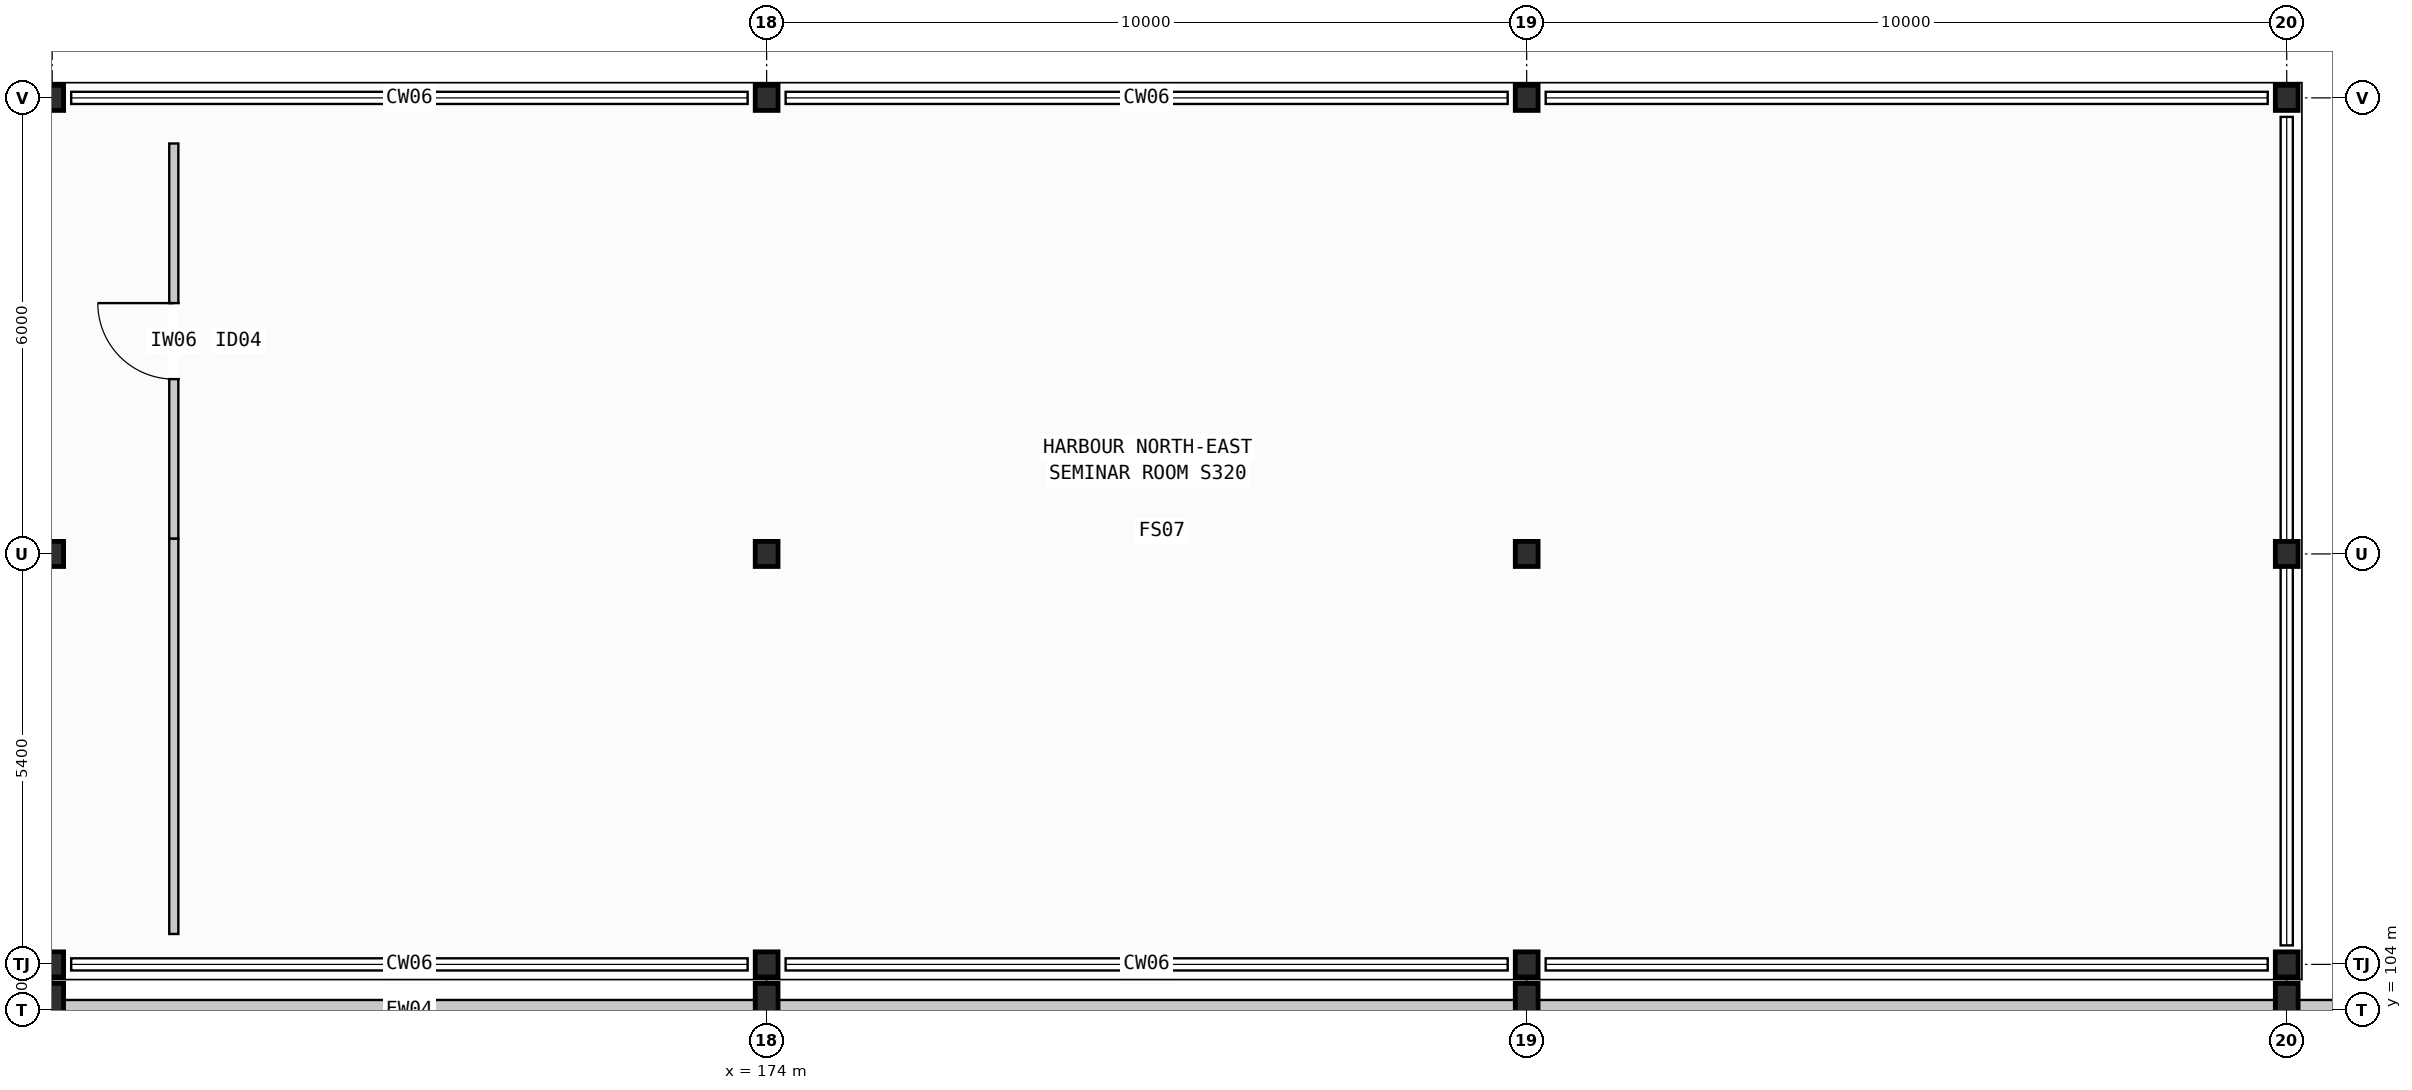
"""IFC4 building model, lengths in metres.
Left out: names, types, materials, properties, quantities, classifications, styles, units other than length and angle.
Written with IfcOpenShell. Run it as: python <this file> out.ifc"""

import sys

from ifc_helpers import new_model, si_unit, direction, frame, frame_2d, origin, origin_2d, place, context, subcontext, project, spatial, rectangle, i_section, extrude, element, fill, save


model = new_model("IFC4")
c1 = context("Model", 3, precision=1e-05, world=origin(), true_north=direction((0.0, 1.0)))
c2 = subcontext(c1, "Body", "Model", "MODEL_VIEW")
j1 = project(units=[si_unit("LENGTHUNIT", "METRE"), si_unit("PLANEANGLEUNIT", "RADIAN")], contexts=[c1])
p1 = place(None, origin())
s1 = spatial("IfcSite", under=j1, at=p1, CompositionType="ELEMENT")
p2 = place(p1, origin())
s2 = spatial("IfcBuilding", under=s1, at=p2, CompositionType="ELEMENT")
p3 = place(p2, frame((0.0, 0.0, 16.8)))
s3 = spatial("IfcBuildingStorey", under=s2, at=p3, CompositionType="ELEMENT", Elevation=16.8)
p4 = place(p3, frame((164.6, 104.0, 0.0), z_axis=(0.0, 0.0, 1.0), x_axis=(1.0, 0.0, 0.0)))
e1 = element("IfcColumn", 1, at=p4, inside=s3, PredefinedType="COLUMN", context=c2, shape_type="SweptSolid", body=[
    extrude(i_section(OverallWidth=0.3, OverallDepth=0.7, WebThickness=0.017, FlangeThickness=0.032, FilletRadius=0.027, at=origin_2d()), origin(), (0.0, 0.0, 1.0), 5.0),
])
for number, where, z_axis, x_axis in (
    (2, (164.6, 104.6, 0.0), (0.0, 0.0, 1.0), (1.0, 0.0, 0.0)),
    (3, (164.6, 110.0, 0.0), (0.0, 0.0, 1.0), (1.0, 0.0, 0.0)),
    (4, (164.6, 116.0, 0.0), (0.0, 0.0, 1.0), (1.0, 0.0, 0.0)),
):
    element("IfcColumn", number, at=place(p3, frame(where, z_axis=z_axis, x_axis=x_axis)), inside=s3, PredefinedType="COLUMN", context=c2, shape_type="SweptSolid", body=[
        extrude(i_section(OverallWidth=0.3, OverallDepth=0.33, WebThickness=0.01, FlangeThickness=0.017, FilletRadius=0.027, at=origin_2d()), origin(), (0.0, 0.0, 1.0), 4.8),
    ])
p5 = place(p3, frame((174.0, 104.0, 0.0), z_axis=(0.0, 0.0, 1.0), x_axis=(1.0, 0.0, 0.0)))
e5 = element("IfcColumn", 5, at=p5, inside=s3, PredefinedType="COLUMN", context=c2, shape_type="SweptSolid", body=[
    extrude(i_section(OverallWidth=0.3, OverallDepth=0.7, WebThickness=0.017, FlangeThickness=0.032, FilletRadius=0.027, at=origin_2d()), origin(), (0.0, 0.0, 1.0), 5.0),
])
for number, where, z_axis, x_axis in (
    (6, (174.0, 104.6, 0.0), (0.0, 0.0, 1.0), (1.0, 0.0, 0.0)),
    (7, (174.0, 110.0, 0.0), (0.0, 0.0, 1.0), (1.0, 0.0, 0.0)),
    (8, (174.0, 116.0, 0.0), (0.0, 0.0, 1.0), (1.0, 0.0, 0.0)),
):
    element("IfcColumn", number, at=place(p3, frame(where, z_axis=z_axis, x_axis=x_axis)), inside=s3, PredefinedType="COLUMN", context=c2, shape_type="SweptSolid", body=[
        extrude(i_section(OverallWidth=0.3, OverallDepth=0.33, WebThickness=0.01, FlangeThickness=0.017, FilletRadius=0.027, at=origin_2d()), origin(), (0.0, 0.0, 1.0), 4.8),
    ])
p6 = place(p3, frame((184.0, 104.0, 0.0), z_axis=(0.0, 0.0, 1.0), x_axis=(1.0, 0.0, 0.0)))
e9 = element("IfcColumn", 9, at=p6, inside=s3, PredefinedType="COLUMN", context=c2, shape_type="SweptSolid", body=[
    extrude(i_section(OverallWidth=0.3, OverallDepth=0.7, WebThickness=0.017, FlangeThickness=0.032, FilletRadius=0.027, at=origin_2d()), origin(), (0.0, 0.0, 1.0), 5.0),
])
for number, where, z_axis, x_axis in (
    (10, (184.0, 104.6, 0.0), (0.0, 0.0, 1.0), (1.0, 0.0, 0.0)),
    (11, (184.0, 110.0, 0.0), (0.0, 0.0, 1.0), (1.0, 0.0, 0.0)),
    (12, (184.0, 116.0, 0.0), (0.0, 0.0, 1.0), (1.0, 0.0, 0.0)),
):
    element("IfcColumn", number, at=place(p3, frame(where, z_axis=z_axis, x_axis=x_axis)), inside=s3, PredefinedType="COLUMN", context=c2, shape_type="SweptSolid", body=[
        extrude(i_section(OverallWidth=0.3, OverallDepth=0.33, WebThickness=0.01, FlangeThickness=0.017, FilletRadius=0.027, at=origin_2d()), origin(), (0.0, 0.0, 1.0), 4.8),
    ])
p7 = place(p3, frame((194.0, 104.0, 0.0), z_axis=(0.0, 0.0, 1.0), x_axis=(1.0, 0.0, 0.0)))
e13 = element("IfcColumn", 13, at=p7, inside=s3, PredefinedType="COLUMN", context=c2, shape_type="SweptSolid", body=[
    extrude(i_section(OverallWidth=0.3, OverallDepth=0.7, WebThickness=0.017, FlangeThickness=0.032, FilletRadius=0.027, at=origin_2d()), origin(), (0.0, 0.0, 1.0), 5.0),
])
for number, where, z_axis, x_axis in (
    (14, (194.0, 104.6, 0.0), (0.0, 0.0, 1.0), (1.0, 0.0, 0.0)),
    (15, (194.0, 110.0, 0.0), (0.0, 0.0, 1.0), (1.0, 0.0, 0.0)),
    (16, (194.0, 116.0, 0.0), (0.0, 0.0, 1.0), (1.0, 0.0, 0.0)),
):
    element("IfcColumn", number, at=place(p3, frame(where, z_axis=z_axis, x_axis=x_axis)), inside=s3, PredefinedType="COLUMN", context=c2, shape_type="SweptSolid", body=[
        extrude(i_section(OverallWidth=0.3, OverallDepth=0.33, WebThickness=0.01, FlangeThickness=0.017, FilletRadius=0.027, at=origin_2d()), origin(), (0.0, 0.0, 1.0), 4.8),
    ])
p8 = place(p3, frame((164.74, 104.0, -0.805), z_axis=(0.0, 0.0, 1.0), x_axis=(1.0, 0.0, 0.0)))
e17 = element("IfcWall", 17, at=p8, inside=s3, PredefinedType="STANDARD", context=c2, shape_type="SweptSolid", body=[
    extrude(rectangle(XDim=9.12, YDim=0.264, at=frame_2d((4.56, 0.0))), origin(), (0.0, 0.0, 1.0), 4.462),
])
p9 = place(p3, frame((174.14, 104.0, -0.805), z_axis=(0.0, 0.0, 1.0), x_axis=(1.0, 0.0, 0.0)))
e18 = element("IfcWall", 18, at=p9, inside=s3, PredefinedType="STANDARD", context=c2, shape_type="SweptSolid", body=[
    extrude(rectangle(XDim=9.72, YDim=0.264, at=frame_2d((4.86, 0.0))), origin(), (0.0, 0.0, 1.0), 6.333),
])
p10 = place(p3, frame((184.14, 104.0, -0.805), z_axis=(0.0, 0.0, 1.0), x_axis=(1.0, 0.0, 0.0)))
e19 = element("IfcWall", 19, at=p10, inside=s3, PredefinedType="STANDARD", context=c2, shape_type="SweptSolid", body=[
    extrude(rectangle(XDim=9.72, YDim=0.264, at=frame_2d((4.86, 0.0))), origin(), (0.0, 0.0, 1.0), 6.448),
])
p11 = place(p3, frame((194.14, 104.0, -0.805), z_axis=(0.0, 0.0, 1.0), x_axis=(1.0, 0.0, 0.0)))
e20 = element("IfcWall", 20, at=p11, inside=s3, PredefinedType="STANDARD", context=c2, shape_type="SweptSolid", body=[
    extrude(rectangle(XDim=9.72, YDim=0.264, at=frame_2d((4.86, 0.0))), origin(), (0.0, 0.0, 1.0), 4.519),
])
p12 = place(p3, frame((166.2, 110.2, 0.0), z_axis=(0.0, 0.0, 1.0), x_axis=(0.0, 1.0, 0.0)))
e21 = element("IfcWall", 21, at=p12, inside=s3, PredefinedType="PARTITIONING", context=c2, shape_type="SweptSolid", body=[
    extrude(rectangle(XDim=5.2, YDim=0.12, at=frame_2d((2.6, 0.0))), origin(), (0.0, 0.0, 1.0), 3.967),
])
p13 = place(p12, frame((2.1, 0.0, 0.0)))
e22 = element("IfcOpeningElement", 22, at=p13, cuts=e21, PredefinedType="OPENING", context=c2, shape_type="SweptSolid", body=[
    extrude(rectangle(XDim=1.0, YDim=2.15, at=frame_2d((0.5, 1.075))), frame((0.0, 0.07, 0.0), z_axis=(0.0, -1.0, 0.0), x_axis=(1.0, 0.0, 0.0)), (0.0, 0.0, 1.0), 0.14),
])
p14 = place(p3, frame((166.2, 105.0, 0.0), z_axis=(0.0, 0.0, 1.0), x_axis=(0.0, 1.0, 0.0)))
e23 = element("IfcWall", 23, at=p14, inside=s3, PredefinedType="PARTITIONING", context=c2, shape_type="SweptSolid", body=[
    extrude(rectangle(XDim=5.2, YDim=0.12, at=frame_2d((2.6, 0.0))), origin(), (0.0, 0.0, 1.0), 3.967),
])
p15 = place(p13, origin())
e24 = element("IfcDoor", 24, at=p15, inside=s3, OperationType="SINGLE_SWING_RIGHT", PredefinedType="DOOR", context=c2, shape_type="SweptSolid", body=[
    extrude(rectangle(XDim=1.0, YDim=2.15, at=frame_2d((0.5, 1.075))), frame((0.0, 0.025, 0.0), z_axis=(0.0, -1.0, 0.0), x_axis=(1.0, 0.0, 0.0)), (0.0, 0.0, 1.0), 0.05),
])
fill(e22, e24)
save(model, sys.argv[1])
